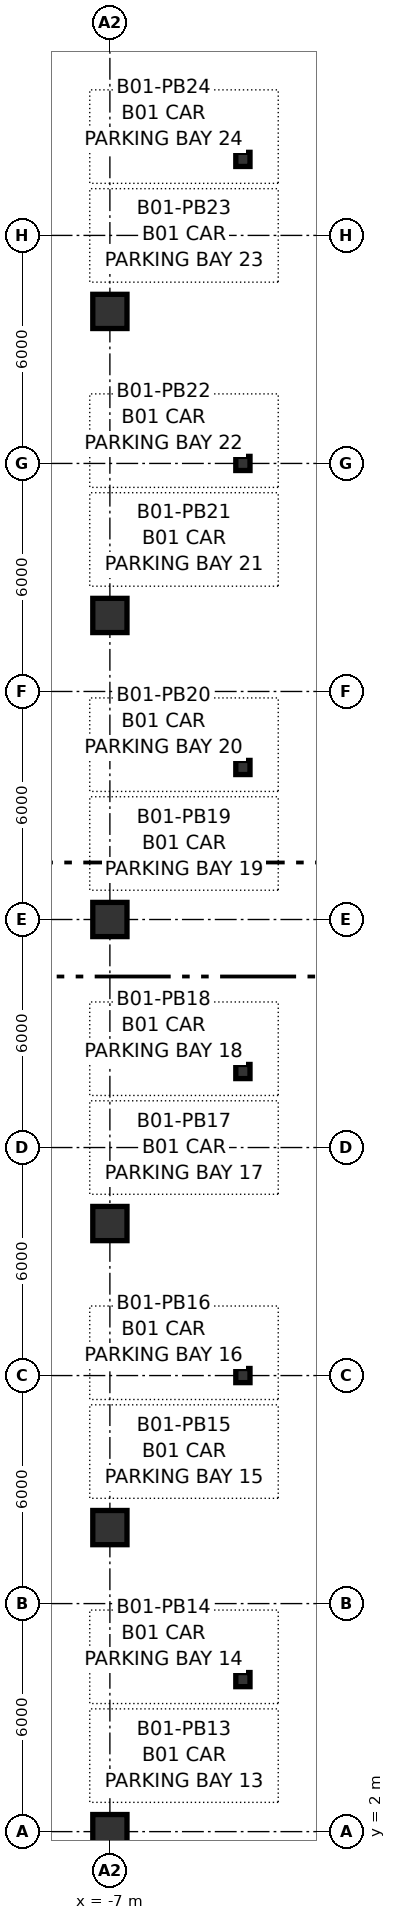
"""IFC4 building model, lengths in metres.
Left out: names, types, materials, properties, quantities, classifications, styles, units other than length and angle.
Written with IfcOpenShell. Run it as: python <this file> out.ifc"""

import sys

from ifc_helpers import new_model, si_unit, direction, frame, origin, origin_2d, place, context, subcontext, project, spatial, rectangle, i_section, extrude, source, transform, mapped, element, save


model = new_model("IFC4")
c1 = context("Model", 3, precision=1e-05, world=origin(), true_north=direction((0.0, 1.0)))
c2 = subcontext(c1, "Body", "Model", "MODEL_VIEW")
j1 = project(units=[si_unit("LENGTHUNIT", "METRE"), si_unit("PLANEANGLEUNIT", "RADIAN")], contexts=[c1])
p1 = place(None, origin())
s1 = spatial("IfcSite", under=j1, at=p1, CompositionType="ELEMENT")
p2 = place(p1, origin())
s2 = spatial("IfcBuilding", under=s1, at=p2, CompositionType="ELEMENT")
p3 = place(p2, frame((0.0, 0.0, -4.2)))
s3 = spatial("IfcBuildingStorey", under=s2, at=p3, CompositionType="ELEMENT", Elevation=-4.2)
m1 = source(origin(), c2, "Body", "SweptSolid", [
    extrude(i_section(OverallWidth=0.374, OverallDepth=0.372, WebThickness=0.016, FlangeThickness=0.026, FilletRadius=0.015, at=origin_2d()), origin(), (0.0, 0.0, 1.0), 3.9),
])
for number, where, z_axis, x_axis in (
    (1, (-3.5, 6.0, 0.0), (0.0, 0.0, 1.0), (1.0, 0.0, 0.0)),
    (2, (-3.5, 14.0, 0.0), (0.0, 0.0, 1.0), (1.0, 0.0, 0.0)),
    (3, (-3.5, 22.0, 0.0), (0.0, 0.0, 1.0), (1.0, 0.0, 0.0)),
    (4, (-3.5, 30.0, 0.0), (0.0, 0.0, 1.0), (1.0, 0.0, 0.0)),
    (5, (-3.5, 38.0, 0.0), (0.0, 0.0, 1.0), (1.0, 0.0, 0.0)),
    (6, (-3.5, 46.0, 0.0), (0.0, 0.0, 1.0), (1.0, 0.0, 0.0)),
):
    element("IfcColumn", number, at=place(p3, frame(where, z_axis=z_axis, x_axis=x_axis)), inside=s3, PredefinedType="PILASTER", context=c2, shape_type="MappedRepresentation", body=[
        mapped(m1, transform((0.0, 0.0, 0.0), x_axis=(1.0, 0.0, 0.0), y_axis=(0.0, 1.0, 0.0), z_axis=(0.0, 0.0, 1.0), scale=1.0)),
    ])
m2 = source(origin(), c2, "Body", "SweptSolid", [
    extrude(rectangle(XDim=0.9, YDim=0.9, at=origin_2d()), origin(), (0.0, 0.0, 1.0), 3.985),
])
for number, where, z_axis, x_axis in (
    (7, (-7.0, 2.0, 0.0), (0.0, 0.0, 1.0), (1.0, 0.0, 0.0)),
    (8, (-7.0, 10.0, 0.0), (0.0, 0.0, 1.0), (1.0, 0.0, 0.0)),
    (9, (-7.0, 18.0, 0.0), (0.0, 0.0, 1.0), (1.0, 0.0, 0.0)),
    (10, (-7.0, 26.0, 0.0), (0.0, 0.0, 1.0), (1.0, 0.0, 0.0)),
    (11, (-7.0, 34.0, 0.0), (0.0, 0.0, 1.0), (1.0, 0.0, 0.0)),
    (12, (-7.0, 42.0, 0.0), (0.0, 0.0, 1.0), (1.0, 0.0, 0.0)),
):
    element("IfcColumn", number, at=place(p3, frame(where, z_axis=z_axis, x_axis=x_axis)), inside=s3, PredefinedType="COLUMN", context=c2, shape_type="MappedRepresentation", body=[
        mapped(m2, transform((0.0, 0.0, 0.0), x_axis=(1.0, 0.0, 0.0), y_axis=(0.0, 1.0, 0.0), z_axis=(0.0, 0.0, 1.0), scale=1.0)),
    ])
save(model, sys.argv[1])
